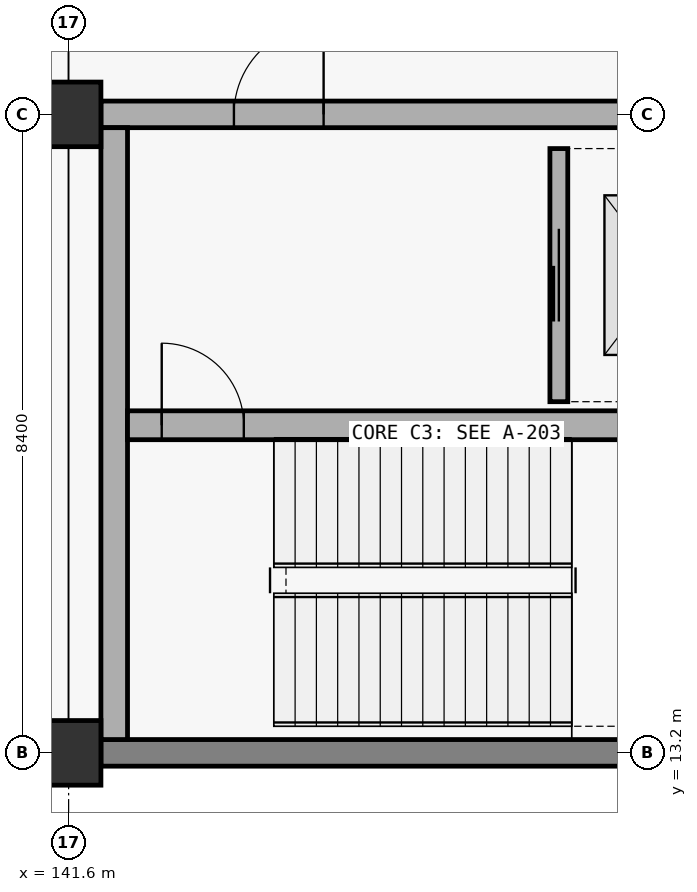
"""IFC4 building model, lengths in metres.
Left out: names, types, materials, properties, quantities, classifications, styles, units other than length and angle.
Written with IfcOpenShell. Run it as: python <this file> out.ifc"""

import sys

from ifc_helpers import new_model, si_unit, direction, frame, frame_2d, origin, origin_2d, place, context, subcontext, project, spatial, rectangle, extrude, element, fill, save


model = new_model("IFC4")
c1 = context("Model", 3, precision=1e-05, world=origin(), true_north=direction((0.0, 1.0)))
c2 = subcontext(c1, "Body", "Model", "MODEL_VIEW")
j1 = project(units=[si_unit("LENGTHUNIT", "METRE"), si_unit("PLANEANGLEUNIT", "RADIAN")], contexts=[c1])
p1 = place(None, origin())
s1 = spatial("IfcSite", under=j1, at=p1, CompositionType="ELEMENT")
p2 = place(p1, origin())
s2 = spatial("IfcBuilding", under=s1, at=p2, CompositionType="ELEMENT")
p3 = place(p2, frame((0.0, 0.0, 5.4)))
s3 = spatial("IfcBuildingStorey", under=s2, at=p3, CompositionType="ELEMENT", Elevation=5.4)
for number, where, z_axis, x_axis in (
    (1, (141.6, 13.2, 0.0), (0.0, 0.0, 1.0), (1.0, 0.0, 0.0)),
    (2, (141.6, 21.6, 0.0), (0.0, 0.0, 1.0), (1.0, 0.0, 0.0)),
):
    element("IfcColumn", number, at=place(p3, frame(where, z_axis=z_axis, x_axis=x_axis)), inside=s3, PredefinedType="COLUMN", context=c2, shape_type="SweptSolid", body=[
        extrude(rectangle(XDim=0.85, YDim=0.85, at=origin_2d()), origin(), (0.0, 0.0, 1.0), 5.1),
    ])
p4 = place(p3, frame((151.375, 13.2, 0.0), z_axis=(0.0, 0.0, 1.0), x_axis=(-1.0, 0.0, 0.0)))
e3 = element("IfcWall", 3, at=p4, inside=s3, PredefinedType="SHEAR", context=c2, shape_type="SweptSolid", body=[
    extrude(rectangle(XDim=9.35, YDim=0.35, at=frame_2d((4.675, 0.0))), origin(), (0.0, 0.0, 1.0), 5.1),
])
p5 = place(p3, frame((142.025, 21.6, 0.0), z_axis=(0.0, 0.0, 1.0), x_axis=(1.0, 0.0, 0.0)))
e4 = element("IfcWall", 4, at=p5, inside=s3, PredefinedType="SHEAR", context=c2, shape_type="SweptSolid", body=[
    extrude(rectangle(XDim=9.35, YDim=0.35, at=frame_2d((4.675, 0.0))), origin(), (0.0, 0.0, 1.0), 5.1),
])
p6 = place(p5, frame((1.75, 0.0, 0.0)))
e5 = element("IfcOpeningElement", 5, at=p6, cuts=e4, PredefinedType="OPENING", context=c2, shape_type="SweptSolid", body=[
    extrude(rectangle(XDim=1.18, YDim=2.24, at=frame_2d((0.59, 1.12))), frame((0.0, 0.185, 0.0), z_axis=(0.0, -1.0, 0.0), x_axis=(1.0, 0.0, 0.0)), (0.0, 0.0, 1.0), 0.37),
])
p7 = place(p3, frame((142.2, 13.375, 0.0), z_axis=(0.0, 0.0, 1.0), x_axis=(0.0, 1.0, 0.0)))
e6 = element("IfcWall", 6, at=p7, inside=s3, PredefinedType="SHEAR", context=c2, shape_type="SweptSolid", body=[
    extrude(rectangle(XDim=8.05, YDim=0.35, at=frame_2d((4.025, 0.0))), origin(), (0.0, 0.0, 1.0), 5.1),
])
p8 = place(p3, frame((142.375, 17.51, 0.0), z_axis=(0.0, 0.0, 1.0), x_axis=(1.0, 0.0, 0.0)))
e7 = element("IfcWall", 7, at=p8, inside=s3, PredefinedType="SHEAR", context=c2, shape_type="SweptSolid", body=[
    extrude(rectangle(XDim=8.65, YDim=0.38, at=frame_2d((4.325, 0.0))), origin(), (0.0, 0.0, 1.0), 5.1),
])
p9 = place(p8, frame((0.45, 0.0, 0.0)))
e8 = element("IfcOpeningElement", 8, at=p9, cuts=e7, PredefinedType="OPENING", context=c2, shape_type="SweptSolid", body=[
    extrude(rectangle(XDim=1.08, YDim=2.18, at=frame_2d((0.54, 1.09))), frame((0.0, 0.2, 0.0), z_axis=(0.0, -1.0, 0.0), x_axis=(1.0, 0.0, 0.0)), (0.0, 0.0, 1.0), 0.4),
])
p10 = place(p3, frame((148.05, 17.82, 0.0), z_axis=(0.0, 0.0, 1.0), x_axis=(0.0, 1.0, 0.0)))
e9 = element("IfcWall", 9, at=p10, inside=s3, PredefinedType="PARTITIONING", context=c2, shape_type="SweptSolid", body=[
    extrude(rectangle(XDim=3.33, YDim=0.235, at=frame_2d((1.665, 0.0))), origin(), (0.0, 0.0, 1.0), 4.72),
])
p11 = place(p10, frame((1.055, 0.0, 0.0)))
e10 = element("IfcOpeningElement", 10, at=p11, cuts=e9, PredefinedType="OPENING", context=c2, shape_type="SweptSolid", body=[
    extrude(rectangle(XDim=1.22, YDim=2.24, at=frame_2d((0.61, 1.12))), frame((0.0, 0.127, 0.0), z_axis=(0.0, -1.0, 0.0), x_axis=(1.0, 0.0, 0.0)), (0.0, 0.0, 1.0), 0.255),
])
p12 = place(p9, origin())
e11 = element("IfcDoor", 11, at=p12, inside=s3, OperationType="SINGLE_SWING_LEFT", PredefinedType="DOOR", context=c2, shape_type="SweptSolid", body=[
    extrude(rectangle(XDim=1.08, YDim=2.18, at=frame_2d((0.54, 1.09))), frame((0.0, 0.025, 0.0), z_axis=(0.0, -1.0, 0.0), x_axis=(1.0, 0.0, 0.0)), (0.0, 0.0, 1.0), 0.05),
])
fill(e8, e11)
p13 = place(p6, origin())
e12 = element("IfcDoor", 12, at=p13, inside=s3, OperationType="SINGLE_SWING_RIGHT", PredefinedType="DOOR", context=c2, shape_type="SweptSolid", body=[
    extrude(rectangle(XDim=1.18, YDim=2.24, at=frame_2d((0.59, 1.12))), frame((0.0, 0.025, 0.0), z_axis=(0.0, -1.0, 0.0), x_axis=(1.0, 0.0, 0.0)), (0.0, 0.0, 1.0), 0.05),
])
fill(e5, e12)
p14 = place(p11, origin())
e13 = element("IfcDoor", 13, at=p14, inside=s3, OperationType="SLIDING_TO_RIGHT", PredefinedType="DOOR", context=c2, shape_type="SweptSolid", body=[
    extrude(rectangle(XDim=1.22, YDim=2.24, at=frame_2d((0.61, 1.12))), frame((0.0, 0.025, 0.0), z_axis=(0.0, -1.0, 0.0), x_axis=(1.0, 0.0, 0.0)), (0.0, 0.0, 1.0), 0.05),
])
fill(e10, e13)
save(model, sys.argv[1])
